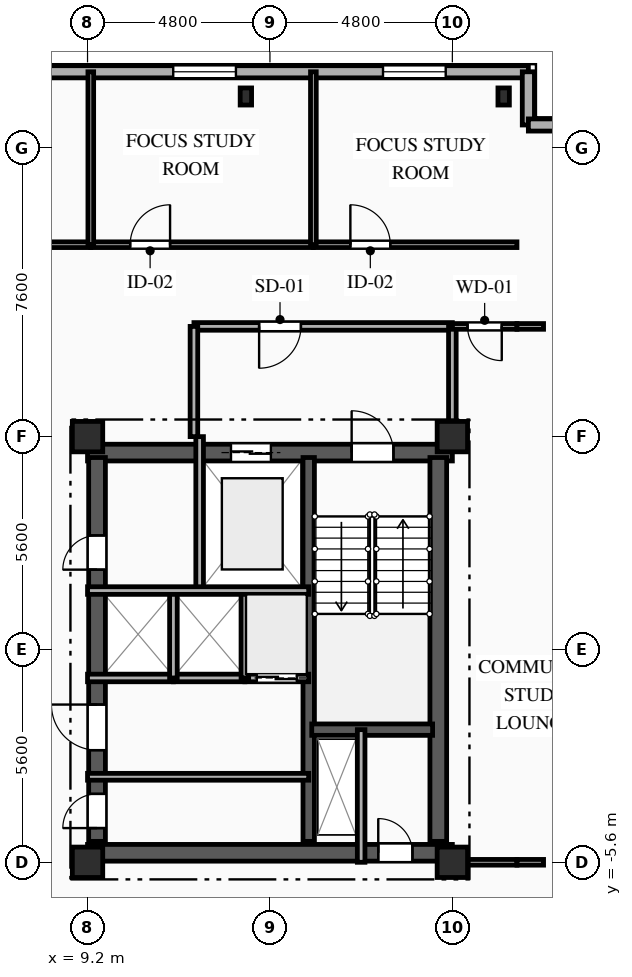
"""IFC4 building model, lengths in metres.
Left out: names, types, materials, properties, quantities, classifications, styles, units other than length and angle.
Written with IfcOpenShell. Run it as: python <this file> out.ifc"""

import sys

from ifc_helpers import new_model, si_unit, direction, frame, frame_2d, origin, origin_2d, place, context, subcontext, project, spatial, rectangle, i_section, extrude, element, fill, save


model = new_model("IFC4")
c1 = context("Model", 3, precision=1e-05, world=origin(), true_north=direction((0.0, 1.0)))
c2 = subcontext(c1, "Body", "Model", "MODEL_VIEW")
j1 = project(units=[si_unit("LENGTHUNIT", "METRE"), si_unit("PLANEANGLEUNIT", "RADIAN")], contexts=[c1])
p1 = place(None, origin())
s1 = spatial("IfcSite", under=j1, at=p1, CompositionType="ELEMENT")
p2 = place(p1, origin())
s2 = spatial("IfcBuilding", under=s1, at=p2, CompositionType="ELEMENT")
p3 = place(p2, frame((0.0, 0.0, 248.4)))
s3 = spatial("IfcBuildingStorey", under=s2, at=p3, CompositionType="ELEMENT", Elevation=248.4)
for number, where, z_axis, x_axis in (
    (1, (9.2, -5.6, 0.0), (0.0, 0.0, 1.0), (1.0, 0.0, 0.0)),
    (2, (9.2, 5.6, 0.0), (0.0, 0.0, 1.0), (1.0, 0.0, 0.0)),
    (3, (18.8, -5.6, 0.0), (0.0, 0.0, 1.0), (1.0, 0.0, 0.0)),
    (4, (18.8, 5.6, 0.0), (0.0, 0.0, 1.0), (1.0, 0.0, 0.0)),
):
    element("IfcColumn", number, at=place(p3, frame(where, z_axis=z_axis, x_axis=x_axis)), inside=s3, PredefinedType="COLUMN", context=c2, shape_type="SweptSolid", body=[
        extrude(rectangle(XDim=0.8, YDim=0.8, at=origin_2d()), origin(), (0.0, 0.0, 1.0), 3.35),
    ])
for number, where, z_axis, x_axis in (
    (5, (20.15, 14.55, 0.0), (0.0, 0.0, 1.0), (1.0, 0.0, 0.0)),
    (6, (13.367, 14.55, 0.0), (0.0, 0.0, 1.0), (1.0, 0.0, 0.0)),
):
    element("IfcColumn", number, at=place(p3, frame(where, z_axis=z_axis, x_axis=x_axis)), inside=s3, PredefinedType="COLUMN", context=c2, shape_type="SweptSolid", body=[
        extrude(i_section(OverallWidth=0.3, OverallDepth=0.45, WebThickness=0.014, FlangeThickness=0.026, FilletRadius=0.027, at=origin_2d()), origin(), (0.0, 0.0, 1.0), 3.35),
    ])
p4 = place(p3, frame((-21.2, 15.2, 0.0), z_axis=(0.0, 0.0, 1.0), x_axis=(1.0, 0.0, 0.0)))
e7 = element("IfcWall", 7, at=p4, inside=s3, PredefinedType="SOLIDWALL", context=c2, shape_type="SweptSolid", body=[
    extrude(rectangle(XDim=42.0, YDim=0.32, at=frame_2d((21.0, 0.0))), origin(), (0.0, 0.0, 1.0), 3.04),
])
p5 = place(p4, frame((3.095, 0.0, 0.85)))
e8 = element("IfcOpeningElement", 8, at=p5, cuts=e7, PredefinedType="OPENING", context=c2, shape_type="SweptSolid", body=[
    extrude(rectangle(XDim=1.65, YDim=1.85, at=frame_2d((0.825, 0.925))), frame((0.0, 0.17, 0.0), z_axis=(0.0, -1.0, 0.0), x_axis=(1.0, 0.0, 0.0)), (0.0, 0.0, 1.0), 0.34),
])
p6 = place(p4, frame((10.45, 0.0, 0.85)))
e9 = element("IfcOpeningElement", 9, at=p6, cuts=e7, PredefinedType="OPENING", context=c2, shape_type="SweptSolid", body=[
    extrude(rectangle(XDim=1.5, YDim=1.85, at=frame_2d((0.75, 0.925))), frame((0.0, 0.17, 0.0), z_axis=(0.0, -1.0, 0.0), x_axis=(1.0, 0.0, 0.0)), (0.0, 0.0, 1.0), 0.34),
])
p7 = place(p4, frame((15.055, 0.0, 0.85)))
e10 = element("IfcOpeningElement", 10, at=p7, cuts=e7, PredefinedType="OPENING", context=c2, shape_type="SweptSolid", body=[
    extrude(rectangle(XDim=1.65, YDim=1.85, at=frame_2d((0.825, 0.925))), frame((0.0, 0.17, 0.0), z_axis=(0.0, -1.0, 0.0), x_axis=(1.0, 0.0, 0.0)), (0.0, 0.0, 1.0), 0.34),
])
p8 = place(p4, frame((20.895, 0.0, 0.85)))
e11 = element("IfcOpeningElement", 11, at=p8, cuts=e7, PredefinedType="OPENING", context=c2, shape_type="SweptSolid", body=[
    extrude(rectangle(XDim=1.65, YDim=1.85, at=frame_2d((0.825, 0.925))), frame((0.0, 0.17, 0.0), z_axis=(0.0, -1.0, 0.0), x_axis=(1.0, 0.0, 0.0)), (0.0, 0.0, 1.0), 0.34),
])
p9 = place(p4, frame((26.775, 0.0, 0.85)))
e12 = element("IfcOpeningElement", 12, at=p9, cuts=e7, PredefinedType="OPENING", context=c2, shape_type="SweptSolid", body=[
    extrude(rectangle(XDim=1.65, YDim=1.85, at=frame_2d((0.825, 0.925))), frame((0.0, 0.17, 0.0), z_axis=(0.0, -1.0, 0.0), x_axis=(1.0, 0.0, 0.0)), (0.0, 0.0, 1.0), 0.34),
])
p10 = place(p4, frame((32.655, 0.0, 0.85)))
e13 = element("IfcOpeningElement", 13, at=p10, cuts=e7, PredefinedType="OPENING", context=c2, shape_type="SweptSolid", body=[
    extrude(rectangle(XDim=1.65, YDim=1.85, at=frame_2d((0.825, 0.925))), frame((0.0, 0.17, 0.0), z_axis=(0.0, -1.0, 0.0), x_axis=(1.0, 0.0, 0.0)), (0.0, 0.0, 1.0), 0.34),
])
p11 = place(p4, frame((38.175, 0.0, 0.85)))
e14 = element("IfcOpeningElement", 14, at=p11, cuts=e7, PredefinedType="OPENING", context=c2, shape_type="SweptSolid", body=[
    extrude(rectangle(XDim=1.65, YDim=1.85, at=frame_2d((0.825, 0.925))), frame((0.0, 0.17, 0.0), z_axis=(0.0, -1.0, 0.0), x_axis=(1.0, 0.0, 0.0)), (0.0, 0.0, 1.0), 0.34),
])
for number, where, z_axis, x_axis in (
    (15, (20.8, 15.2, 0.0), (0.0, 0.0, 1.0), (0.0, -1.0, 0.0)),
    (16, (20.8, 13.8, 0.0), (0.0, 0.0, 1.0), (1.0, 0.0, 0.0)),
):
    element("IfcWall", number, at=place(p3, frame(where, z_axis=z_axis, x_axis=x_axis)), inside=s3, PredefinedType="SOLIDWALL", context=c2, shape_type="SweptSolid", body=[
        extrude(rectangle(XDim=1.4, YDim=0.32, at=frame_2d((0.7, 0.0))), origin(), (0.0, 0.0, 1.0), 3.04),
    ])
p12 = place(p3, frame((9.2, 5.18, 0.0), z_axis=(0.0, 0.0, 1.0), x_axis=(1.0, 0.0, 0.0)))
e17 = element("IfcWall", 17, at=p12, inside=s3, PredefinedType="SHEAR", context=c2, shape_type="SweptSolid", body=[
    extrude(rectangle(XDim=9.6, YDim=0.44, at=frame_2d((4.8, 0.0))), origin(), (0.0, 0.0, 1.0), 3.04),
])
p13 = place(p12, frame((6.95, 0.0, 0.0)))
e18 = element("IfcOpeningElement", 18, at=p13, cuts=e17, PredefinedType="OPENING", context=c2, shape_type="SweptSolid", body=[
    extrude(rectangle(XDim=1.1, YDim=2.15, at=frame_2d((0.55, 1.075))), frame((0.0, 0.23, 0.0), z_axis=(0.0, -1.0, 0.0), x_axis=(1.0, 0.0, 0.0)), (0.0, 0.0, 1.0), 0.46),
])
p14 = place(p12, frame((3.775, 0.0, 0.0)))
e19 = element("IfcOpeningElement", 19, at=p14, cuts=e17, PredefinedType="OPENING", context=c2, shape_type="SweptSolid", body=[
    extrude(rectangle(XDim=1.05, YDim=2.1, at=frame_2d((0.525, 1.05))), frame((0.0, 0.23, 0.0), z_axis=(0.0, -1.0, 0.0), x_axis=(1.0, 0.0, 0.0)), (0.0, 0.0, 1.0), 0.46),
])
p15 = place(p3, frame((9.2, -5.35, 0.0), z_axis=(0.0, 0.0, 1.0), x_axis=(1.0, 0.0, 0.0)))
e20 = element("IfcWall", 20, at=p15, inside=s3, PredefinedType="SHEAR", context=c2, shape_type="SweptSolid", body=[
    extrude(rectangle(XDim=9.6, YDim=0.44, at=frame_2d((4.8, 0.0))), origin(), (0.0, 0.0, 1.0), 3.04),
])
p16 = place(p15, frame((7.65, 0.0, 0.0)))
e21 = element("IfcOpeningElement", 21, at=p16, cuts=e20, PredefinedType="OPENING", context=c2, shape_type="SweptSolid", body=[
    extrude(rectangle(XDim=0.9, YDim=2.1, at=frame_2d((0.45, 1.05))), frame((0.0, 0.23, 0.0), z_axis=(0.0, -1.0, 0.0), x_axis=(1.0, 0.0, 0.0)), (0.0, 0.0, 1.0), 0.46),
])
p17 = place(p3, frame((9.45, -5.05, 0.0), z_axis=(0.0, 0.0, 1.0), x_axis=(0.0, 1.0, 0.0)))
e22 = element("IfcWall", 22, at=p17, inside=s3, PredefinedType="SHEAR", context=c2, shape_type="SweptSolid", body=[
    extrude(rectangle(XDim=10.1, YDim=0.44, at=frame_2d((5.05, 0.0))), origin(), (0.0, 0.0, 1.0), 3.04),
])
p18 = place(p17, frame((7.15, 0.0, 0.0)))
e23 = element("IfcOpeningElement", 23, at=p18, cuts=e22, PredefinedType="OPENING", context=c2, shape_type="SweptSolid", body=[
    extrude(rectangle(XDim=0.9, YDim=2.1, at=frame_2d((0.45, 1.05))), frame((0.0, 0.23, 0.0), z_axis=(0.0, -1.0, 0.0), x_axis=(1.0, 0.0, 0.0)), (0.0, 0.0, 1.0), 0.46),
])
p19 = place(p17, frame((2.4, 0.0, 0.0)))
e24 = element("IfcOpeningElement", 24, at=p19, cuts=e22, PredefinedType="OPENING", context=c2, shape_type="SweptSolid", body=[
    extrude(rectangle(XDim=1.2, YDim=2.15, at=frame_2d((0.6, 1.075))), frame((0.0, 0.23, 0.0), z_axis=(0.0, -1.0, 0.0), x_axis=(1.0, 0.0, 0.0)), (0.0, 0.0, 1.0), 0.46),
])
p20 = place(p17, frame((0.35, 0.0, 0.0)))
e25 = element("IfcOpeningElement", 25, at=p20, cuts=e22, PredefinedType="OPENING", context=c2, shape_type="SweptSolid", body=[
    extrude(rectangle(XDim=0.9, YDim=2.1, at=frame_2d((0.45, 1.05))), frame((0.0, 0.23, 0.0), z_axis=(0.0, -1.0, 0.0), x_axis=(1.0, 0.0, 0.0)), (0.0, 0.0, 1.0), 0.46),
])
p21 = place(p3, frame((18.43, -5.05, 0.0), z_axis=(0.0, 0.0, 1.0), x_axis=(0.0, 1.0, 0.0)))
e26 = element("IfcWall", 26, at=p21, inside=s3, PredefinedType="SHEAR", context=c2, shape_type="SweptSolid", body=[
    extrude(rectangle(XDim=10.1, YDim=0.44, at=frame_2d((5.05, 0.0))), origin(), (0.0, 0.0, 1.0), 3.04),
])
p22 = place(p3, frame((15.02, -5.05, 0.0), z_axis=(0.0, 0.0, 1.0), x_axis=(0.0, 1.0, 0.0)))
e27 = element("IfcWall", 27, at=p22, inside=s3, PredefinedType="SHEAR", context=c2, shape_type="SweptSolid", body=[
    extrude(rectangle(XDim=10.1, YDim=0.3, at=frame_2d((5.05, 0.0))), origin(), (0.0, 0.0, 1.0), 3.04),
])
p23 = place(p3, frame((15.1, -2.11, 0.0), z_axis=(0.0, 0.0, 1.0), x_axis=(1.0, 0.0, 0.0)))
e28 = element("IfcWall", 28, at=p23, inside=s3, PredefinedType="SHEAR", context=c2, shape_type="SweptSolid", body=[
    extrude(rectangle(XDim=3.18, YDim=0.3, at=frame_2d((1.59, 0.0))), origin(), (0.0, 0.0, 1.0), 3.04),
])
p24 = place(p3, frame((16.4, -2.11, 0.0), z_axis=(0.0, 0.0, 1.0), x_axis=(0.0, -1.0, 0.0)))
e29 = element("IfcWall", 29, at=p24, inside=s3, PredefinedType="PARTITIONING", context=c2, shape_type="SweptSolid", body=[
    extrude(rectangle(XDim=3.49, YDim=0.2, at=frame_2d((1.745, 0.0))), origin(), (0.0, 0.0, 1.0), 3.04),
])
p25 = place(p3, frame((12.15, 5.6, 0.0), z_axis=(0.0, 0.0, 1.0), x_axis=(0.0, -1.0, 0.0)))
e30 = element("IfcWall", 30, at=p25, inside=s3, PredefinedType="PARTITIONING", context=c2, shape_type="SweptSolid", body=[
    extrude(rectangle(XDim=4.05, YDim=0.2, at=frame_2d((2.025, 0.0))), origin(), (0.0, 0.0, 1.0), 3.04),
])
p26 = place(p3, frame((18.8, 8.5, 0.0), z_axis=(0.0, 0.0, 1.0), x_axis=(-1.0, 0.0, 0.0)))
e31 = element("IfcWall", 31, at=p26, inside=s3, PredefinedType="PARTITIONING", context=c2, shape_type="SweptSolid", body=[
    extrude(rectangle(XDim=6.8, YDim=0.2, at=frame_2d((3.4, 0.0))), origin(), (0.0, 0.0, 1.0), 3.04),
])
p27 = place(p26, frame((3.985, 0.0, 0.0)))
e32 = element("IfcOpeningElement", 32, at=p27, cuts=e31, PredefinedType="OPENING", context=c2, shape_type="SweptSolid", body=[
    extrude(rectangle(XDim=1.1, YDim=2.15, at=frame_2d((0.55, 1.075))), frame((0.0, 0.11, 0.0), z_axis=(0.0, -1.0, 0.0), x_axis=(1.0, 0.0, 0.0)), (0.0, 0.0, 1.0), 0.22),
])
p28 = place(p3, frame((12.0, 8.5, 0.0), z_axis=(0.0, 0.0, 1.0), x_axis=(0.0, -1.0, 0.0)))
e33 = element("IfcWall", 33, at=p28, inside=s3, PredefinedType="PARTITIONING", context=c2, shape_type="SweptSolid", body=[
    extrude(rectangle(XDim=2.9, YDim=0.2, at=frame_2d((1.45, 0.0))), origin(), (0.0, 0.0, 1.0), 3.04),
])
p29 = place(p3, frame((18.8, 5.6, 0.0), z_axis=(0.0, 0.0, 1.0), x_axis=(0.0, 1.0, 0.0)))
e34 = element("IfcWall", 34, at=p29, inside=s3, PredefinedType="PARTITIONING", context=c2, shape_type="SweptSolid", body=[
    extrude(rectangle(XDim=2.9, YDim=0.2, at=frame_2d((1.45, 0.0))), origin(), (0.0, 0.0, 1.0), 2.665),
])
p30 = place(p3, frame((9.2, -3.35, 0.0), z_axis=(0.0, 0.0, 1.0), x_axis=(1.0, 0.0, 0.0)))
e35 = element("IfcWall", 35, at=p30, inside=s3, PredefinedType="PARTITIONING", context=c2, shape_type="SweptSolid", body=[
    extrude(rectangle(XDim=5.82, YDim=0.18, at=frame_2d((2.91, 0.0))), origin(), (0.0, 0.0, 1.0), 2.755),
])
p31 = place(p3, frame((11.46, -0.75, 0.0), z_axis=(0.0, 0.0, 1.0), x_axis=(-1.0, 0.0, 0.0)))
e36 = element("IfcWall", 36, at=p31, inside=s3, PredefinedType="PARTITIONING", context=c2, shape_type="SweptSolid", body=[
    extrude(rectangle(XDim=2.26, YDim=0.2, at=frame_2d((1.13, 0.0))), origin(), (0.0, 0.0, 1.0), 3.04),
])
p32 = place(p3, frame((13.34, -0.75, 0.0), z_axis=(0.0, 0.0, 1.0), x_axis=(-1.0, 0.0, 0.0)))
e37 = element("IfcWall", 37, at=p32, inside=s3, PredefinedType="PARTITIONING", context=c2, shape_type="SweptSolid", body=[
    extrude(rectangle(XDim=1.88, YDim=0.2, at=frame_2d((0.94, 0.0))), origin(), (0.0, 0.0, 1.0), 3.04),
])
p33 = place(p3, frame((15.02, -0.75, 0.0), z_axis=(0.0, 0.0, 1.0), x_axis=(-1.0, 0.0, 0.0)))
e38 = element("IfcWall", 38, at=p33, inside=s3, PredefinedType="PARTITIONING", context=c2, shape_type="SweptSolid", body=[
    extrude(rectangle(XDim=1.68, YDim=0.2, at=frame_2d((0.84, 0.0))), origin(), (0.0, 0.0, 1.0), 3.04),
])
p34 = place(p33, frame((0.315, 0.0, 0.0)))
e39 = element("IfcOpeningElement", 39, at=p34, cuts=e38, PredefinedType="OPENING", context=c2, shape_type="SweptSolid", body=[
    extrude(rectangle(XDim=1.05, YDim=2.1, at=frame_2d((0.525, 1.05))), frame((0.0, 0.11, 0.0), z_axis=(0.0, -1.0, 0.0), x_axis=(1.0, 0.0, 0.0)), (0.0, 0.0, 1.0), 0.22),
])
for number, where, z_axis, x_axis in (
    (40, (11.46, -0.75, 0.0), (0.0, 0.0, 1.0), (0.0, 1.0, 0.0)),
    (41, (13.34, -0.75, 0.0), (0.0, 0.0, 1.0), (0.0, 1.0, 0.0)),
):
    element("IfcWall", number, at=place(p3, frame(where, z_axis=z_axis, x_axis=x_axis)), inside=s3, PredefinedType="PARTITIONING", context=c2, shape_type="SweptSolid", body=[
        extrude(rectangle(XDim=2.3, YDim=0.2, at=frame_2d((1.15, 0.0))), origin(), (0.0, 0.0, 1.0), 3.04),
    ])
p35 = place(p3, frame((20.5, 8.5, 0.0), z_axis=(0.0, 0.0, 1.0), x_axis=(-1.0, 0.0, 0.0)))
e42 = element("IfcWall", 42, at=p35, inside=s3, PredefinedType="PARTITIONING", context=c2, shape_type="SweptSolid", body=[
    extrude(rectangle(XDim=1.7, YDim=0.15, at=frame_2d((0.85, 0.0))), origin(), (0.0, 0.0, 1.0), 3.04),
])
p36 = place(p35, frame((0.4, 0.0, 0.0)))
e43 = element("IfcOpeningElement", 43, at=p36, cuts=e42, PredefinedType="OPENING", context=c2, shape_type="SweptSolid", body=[
    extrude(rectangle(XDim=0.9, YDim=2.1, at=frame_2d((0.45, 1.05))), frame((0.0, 0.085, 0.0), z_axis=(0.0, -1.0, 0.0), x_axis=(1.0, 0.0, 0.0)), (0.0, 0.0, 1.0), 0.17),
])
p37 = place(p3, frame((21.2, 8.5, 0.0), z_axis=(0.0, 0.0, 1.0), x_axis=(-1.0, 0.0, 0.0)))
e44 = element("IfcWall", 44, at=p37, inside=s3, PredefinedType="PARTITIONING", context=c2, shape_type="SweptSolid", body=[
    extrude(rectangle(XDim=0.7, YDim=0.15, at=frame_2d((0.35, 0.0))), origin(), (0.0, 0.0, 1.0), 3.04),
])
p38 = place(p3, frame((3.429, 10.65, 0.0), z_axis=(0.0, 0.0, 1.0), x_axis=(1.0, 0.0, 0.0)))
e45 = element("IfcWall", 45, at=p38, inside=s3, PredefinedType="PARTITIONING", context=c2, shape_type="SweptSolid", body=[
    extrude(rectangle(XDim=5.857, YDim=0.15, at=frame_2d((2.928, 0.0))), origin(), (0.0, 0.0, 1.0), 3.04),
])
p39 = place(p38, frame((1.036, 0.0, 0.0)))
e46 = element("IfcOpeningElement", 46, at=p39, cuts=e45, PredefinedType="OPENING", context=c2, shape_type="SweptSolid", body=[
    extrude(rectangle(XDim=1.05, YDim=2.15, at=frame_2d((0.525, 1.075))), frame((0.0, 0.085, 0.0), z_axis=(0.0, -1.0, 0.0), x_axis=(1.0, 0.0, 0.0)), (0.0, 0.0, 1.0), 0.17),
])
p40 = place(p3, frame((9.286, 10.65, 0.0), z_axis=(0.0, 0.0, 1.0), x_axis=(1.0, 0.0, 0.0)))
e47 = element("IfcWall", 47, at=p40, inside=s3, PredefinedType="PARTITIONING", context=c2, shape_type="SweptSolid", body=[
    extrude(rectangle(XDim=5.857, YDim=0.15, at=frame_2d((2.929, 0.0))), origin(), (0.0, 0.0, 1.0), 3.04),
])
p41 = place(p40, frame((1.036, 0.0, 0.0)))
e48 = element("IfcOpeningElement", 48, at=p41, cuts=e47, PredefinedType="OPENING", context=c2, shape_type="SweptSolid", body=[
    extrude(rectangle(XDim=1.05, YDim=2.15, at=frame_2d((0.525, 1.075))), frame((0.0, 0.085, 0.0), z_axis=(0.0, -1.0, 0.0), x_axis=(1.0, 0.0, 0.0)), (0.0, 0.0, 1.0), 0.17),
])
p42 = place(p3, frame((15.143, 10.65, 0.0), z_axis=(0.0, 0.0, 1.0), x_axis=(1.0, 0.0, 0.0)))
e49 = element("IfcWall", 49, at=p42, inside=s3, PredefinedType="PARTITIONING", context=c2, shape_type="SweptSolid", body=[
    extrude(rectangle(XDim=5.357, YDim=0.15, at=frame_2d((2.678, 0.0))), origin(), (0.0, 0.0, 1.0), 3.04),
])
p43 = place(p42, frame((0.973, 0.0, 0.0)))
e50 = element("IfcOpeningElement", 50, at=p43, cuts=e49, PredefinedType="OPENING", context=c2, shape_type="SweptSolid", body=[
    extrude(rectangle(XDim=1.05, YDim=2.15, at=frame_2d((0.525, 1.075))), frame((0.0, 0.085, 0.0), z_axis=(0.0, -1.0, 0.0), x_axis=(1.0, 0.0, 0.0)), (0.0, 0.0, 1.0), 0.17),
])
p44 = place(p3, frame((18.8, -5.6, 0.0), z_axis=(0.0, 0.0, 1.0), x_axis=(1.0, 0.0, 0.0)))
e51 = element("IfcWall", 51, at=p44, inside=s3, PredefinedType="PARTITIONING", context=c2, shape_type="SweptSolid", body=[
    extrude(rectangle(XDim=1.7, YDim=0.15, at=frame_2d((0.85, 0.0))), origin(), (0.0, 0.0, 1.0), 3.04),
])
p45 = place(p3, frame((20.5, -5.6, 0.0), z_axis=(0.0, 0.0, 1.0), x_axis=(1.0, 0.0, 0.0)))
e52 = element("IfcWall", 52, at=p45, inside=s3, PredefinedType="PARTITIONING", context=c2, shape_type="SweptSolid", body=[
    extrude(rectangle(XDim=0.7, YDim=0.15, at=frame_2d((0.35, 0.0))), origin(), (0.0, 0.0, 1.0), 3.04),
])
for number, where, z_axis, x_axis in (
    (53, (9.286, 15.2, 0.0), (0.0, 0.0, 1.0), (0.0, -1.0, 0.0)),
    (54, (15.143, 15.2, 0.0), (0.0, 0.0, 1.0), (0.0, -1.0, 0.0)),
):
    element("IfcWall", number, at=place(p3, frame(where, z_axis=z_axis, x_axis=x_axis)), inside=s3, PredefinedType="PARTITIONING", context=c2, shape_type="SweptSolid", body=[
        extrude(rectangle(XDim=4.55, YDim=0.15, at=frame_2d((2.275, 0.0))), origin(), (0.0, 0.0, 1.0), 3.04),
    ])
p46 = place(p3, frame((9.2, 1.55, 0.0), z_axis=(0.0, 0.0, 1.0), x_axis=(1.0, 0.0, 0.0)))
e55 = element("IfcWall", 55, at=p46, inside=s3, PredefinedType="PARTITIONING", context=c2, shape_type="SweptSolid", body=[
    extrude(rectangle(XDim=5.82, YDim=0.2, at=frame_2d((2.91, 0.0))), origin(), (0.0, 0.0, 1.0), 3.04),
])
p47 = place(p10, origin())
e56 = element("IfcWindow", 56, at=p47, inside=s3, PartitioningType="SINGLE_PANEL", PredefinedType="WINDOW", context=c2, shape_type="SweptSolid", body=[
    extrude(rectangle(XDim=1.65, YDim=1.85, at=frame_2d((0.825, 0.925))), frame((0.0, 0.03, 0.0), z_axis=(0.0, -1.0, 0.0), x_axis=(1.0, 0.0, 0.0)), (0.0, 0.0, 1.0), 0.06),
])
fill(e13, e56)
p48 = place(p11, origin())
e57 = element("IfcWindow", 57, at=p48, inside=s3, PartitioningType="SINGLE_PANEL", PredefinedType="WINDOW", context=c2, shape_type="SweptSolid", body=[
    extrude(rectangle(XDim=1.65, YDim=1.85, at=frame_2d((0.825, 0.925))), frame((0.0, 0.03, 0.0), z_axis=(0.0, -1.0, 0.0), x_axis=(1.0, 0.0, 0.0)), (0.0, 0.0, 1.0), 0.06),
])
fill(e14, e57)
p49 = place(p13, origin())
e58 = element("IfcDoor", 58, at=p49, inside=s3, OperationType="SINGLE_SWING_LEFT", PredefinedType="DOOR", context=c2, shape_type="SweptSolid", body=[
    extrude(rectangle(XDim=1.1, YDim=2.15, at=frame_2d((0.55, 1.075))), frame((0.0, 0.025, 0.0), z_axis=(0.0, -1.0, 0.0), x_axis=(1.0, 0.0, 0.0)), (0.0, 0.0, 1.0), 0.05),
])
fill(e18, e58)
p50 = place(p14, origin())
e59 = element("IfcDoor", 59, at=p50, inside=s3, OperationType="DOUBLE_DOOR_SLIDING", PredefinedType="DOOR", context=c2, shape_type="SweptSolid", body=[
    extrude(rectangle(XDim=1.05, YDim=2.1, at=frame_2d((0.525, 1.05))), frame((0.0, 0.025, 0.0), z_axis=(0.0, -1.0, 0.0), x_axis=(1.0, 0.0, 0.0)), (0.0, 0.0, 1.0), 0.05),
])
fill(e19, e59)
p51 = place(p16, origin())
e60 = element("IfcDoor", 60, at=p51, inside=s3, OperationType="SINGLE_SWING_LEFT", PredefinedType="DOOR", context=c2, shape_type="SweptSolid", body=[
    extrude(rectangle(XDim=0.9, YDim=2.1, at=frame_2d((0.45, 1.05))), frame((0.0, 0.025, 0.0), z_axis=(0.0, -1.0, 0.0), x_axis=(1.0, 0.0, 0.0)), (0.0, 0.0, 1.0), 0.05),
])
fill(e21, e60)
p52 = place(p27, origin())
e61 = element("IfcDoor", 61, at=p52, inside=s3, OperationType="SINGLE_SWING_RIGHT", PredefinedType="DOOR", context=c2, shape_type="SweptSolid", body=[
    extrude(rectangle(XDim=1.1, YDim=2.15, at=frame_2d((0.55, 1.075))), frame((0.0, 0.025, 0.0), z_axis=(0.0, -1.0, 0.0), x_axis=(1.0, 0.0, 0.0)), (0.0, 0.0, 1.0), 0.05),
])
fill(e32, e61)
p53 = place(p18, origin())
e62 = element("IfcDoor", 62, at=p53, inside=s3, OperationType="SINGLE_SWING_LEFT", PredefinedType="DOOR", context=c2, shape_type="SweptSolid", body=[
    extrude(rectangle(XDim=0.9, YDim=2.1, at=frame_2d((0.45, 1.05))), frame((0.0, 0.025, 0.0), z_axis=(0.0, -1.0, 0.0), x_axis=(1.0, 0.0, 0.0)), (0.0, 0.0, 1.0), 0.05),
])
fill(e23, e62)
p54 = place(p34, origin())
e63 = element("IfcDoor", 63, at=p54, inside=s3, OperationType="DOUBLE_DOOR_SLIDING", PredefinedType="DOOR", context=c2, shape_type="SweptSolid", body=[
    extrude(rectangle(XDim=1.05, YDim=2.1, at=frame_2d((0.525, 1.05))), frame((0.0, 0.025, 0.0), z_axis=(0.0, -1.0, 0.0), x_axis=(1.0, 0.0, 0.0)), (0.0, 0.0, 1.0), 0.05),
])
fill(e39, e63)
p55 = place(p19, origin())
e64 = element("IfcDoor", 64, at=p55, inside=s3, OperationType="SINGLE_SWING_RIGHT", PredefinedType="DOOR", context=c2, shape_type="SweptSolid", body=[
    extrude(rectangle(XDim=1.2, YDim=2.15, at=frame_2d((0.6, 1.075))), frame((0.0, 0.025, 0.0), z_axis=(0.0, -1.0, 0.0), x_axis=(1.0, 0.0, 0.0)), (0.0, 0.0, 1.0), 0.05),
])
fill(e24, e64)
p56 = place(p20, origin())
e65 = element("IfcDoor", 65, at=p56, inside=s3, OperationType="SINGLE_SWING_LEFT", PredefinedType="DOOR", context=c2, shape_type="SweptSolid", body=[
    extrude(rectangle(XDim=0.9, YDim=2.1, at=frame_2d((0.45, 1.05))), frame((0.0, 0.025, 0.0), z_axis=(0.0, -1.0, 0.0), x_axis=(1.0, 0.0, 0.0)), (0.0, 0.0, 1.0), 0.05),
])
fill(e25, e65)
p57 = place(p36, origin())
e66 = element("IfcDoor", 66, at=p57, inside=s3, OperationType="SINGLE_SWING_LEFT", PredefinedType="DOOR", context=c2, shape_type="SweptSolid", body=[
    extrude(rectangle(XDim=0.9, YDim=2.1, at=frame_2d((0.45, 1.05))), frame((0.0, 0.025, 0.0), z_axis=(0.0, -1.0, 0.0), x_axis=(1.0, 0.0, 0.0)), (0.0, 0.0, 1.0), 0.05),
])
fill(e43, e66)
p58 = place(p41, origin())
e67 = element("IfcDoor", 67, at=p58, inside=s3, OperationType="SINGLE_SWING_RIGHT", PredefinedType="DOOR", context=c2, shape_type="SweptSolid", body=[
    extrude(rectangle(XDim=1.05, YDim=2.15, at=frame_2d((0.525, 1.075))), frame((0.0, 0.025, 0.0), z_axis=(0.0, -1.0, 0.0), x_axis=(1.0, 0.0, 0.0)), (0.0, 0.0, 1.0), 0.05),
])
fill(e48, e67)
p59 = place(p43, origin())
e68 = element("IfcDoor", 68, at=p59, inside=s3, OperationType="SINGLE_SWING_LEFT", PredefinedType="DOOR", context=c2, shape_type="SweptSolid", body=[
    extrude(rectangle(XDim=1.05, YDim=2.15, at=frame_2d((0.525, 1.075))), frame((0.0, 0.025, 0.0), z_axis=(0.0, -1.0, 0.0), x_axis=(1.0, 0.0, 0.0)), (0.0, 0.0, 1.0), 0.05),
])
fill(e50, e68)
save(model, sys.argv[1])
